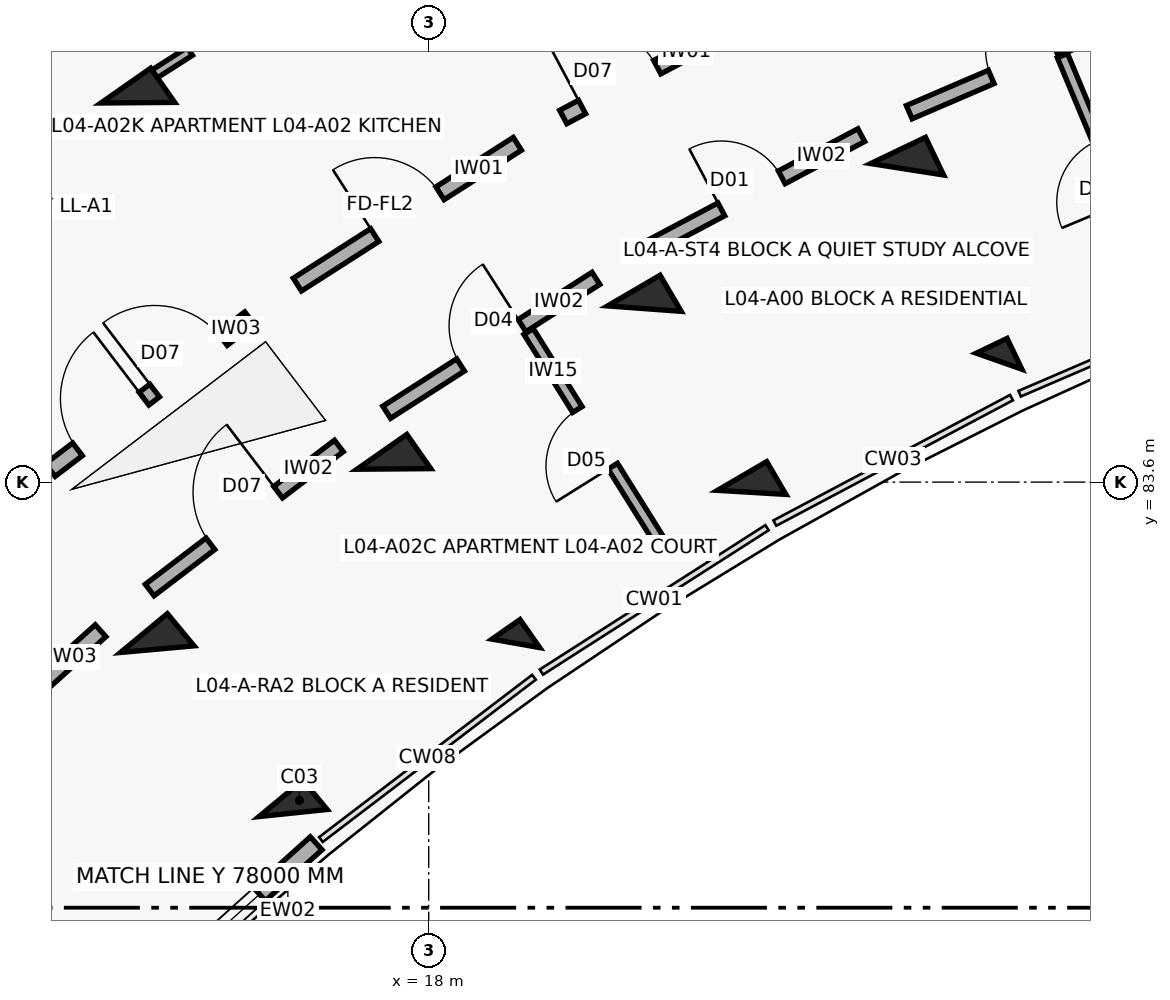
"""IFC4 building model, lengths in metres.
Left out: names, types, materials, properties, quantities, classifications, styles, units other than length and angle.
Written with IfcOpenShell. Run it as: python <this file> out.ifc"""

import sys

from ifc_helpers import new_model, si_unit, direction, frame, frame_2d, origin, origin_2d, place, context, subcontext, project, spatial, rectangle, extrude, element, fill, save


model = new_model("IFC4")
c1 = context("Model", 3, precision=1e-05, world=origin(), true_north=direction((0.0, 1.0)))
c2 = subcontext(c1, "Body", "Model", "MODEL_VIEW")
j1 = project(units=[si_unit("LENGTHUNIT", "METRE"), si_unit("PLANEANGLEUNIT", "RADIAN")], contexts=[c1])
p1 = place(None, origin())
s1 = spatial("IfcSite", under=j1, at=p1, CompositionType="ELEMENT")
p2 = place(p1, origin())
s2 = spatial("IfcBuilding", under=s1, at=p2, CompositionType="ELEMENT")
p3 = place(p2, frame((0.0, 0.0, 14.3)))
s3 = spatial("IfcBuildingStorey", under=s2, at=p3, CompositionType="ELEMENT", Elevation=14.3)
p4 = place(p3, frame((16.215, 79.245, 0.0), z_axis=(0.0, 0.0, 1.0), x_axis=(-0.637961754089, 0.770068049148, 0.0)))
e1 = element("IfcColumn", 1, at=p4, inside=s3, PredefinedType="COLUMN", context=c2, shape_type="SweptSolid", body=[
    extrude(rectangle(XDim=0.5, YDim=0.75, at=origin_2d()), origin(), (0.0, 0.0, 1.0), 3.1),
])
p5 = place(p3, frame((14.429, 81.402, 0.0), z_axis=(0.0, 0.0, 1.0), x_axis=(-0.637961754089, 0.770068049148, 0.0)))
e2 = element("IfcColumn", 2, at=p5, inside=s3, PredefinedType="COLUMN", context=c2, shape_type="SweptSolid", body=[
    extrude(rectangle(XDim=0.55, YDim=0.8, at=origin_2d()), origin(), (0.0, 0.0, 1.0), 3.1),
])
p6 = place(p3, frame((19.146, 81.478, 0.0), z_axis=(0.0, 0.0, 1.0), x_axis=(-0.573004420611, 0.819552276527, 0.0)))
e3 = element("IfcColumn", 3, at=p6, inside=s3, PredefinedType="COLUMN", context=c2, shape_type="SweptSolid", body=[
    extrude(rectangle(XDim=0.45, YDim=0.45, at=origin_2d()), origin(), (0.0, 0.0, 1.0), 3.1),
])
for number, where, z_axis, x_axis in (
    (4, (17.542, 83.773, 0.0), (0.0, 0.0, 1.0), (-0.573, 0.82, 0.0)),
    (5, (14.172, 88.592, 0.0), (0.0, 0.0, 1.0), (-0.573, 0.82, 0.0)),
):
    element("IfcColumn", number, at=place(p3, frame(where, z_axis=z_axis, x_axis=x_axis)), inside=s3, PredefinedType="COLUMN", context=c2, shape_type="SweptSolid", body=[
        extrude(rectangle(XDim=0.55, YDim=0.8, at=origin_2d()), origin(), (0.0, 0.0, 1.0), 3.1),
    ])
p7 = place(p3, frame((22.249, 83.464, 0.0), z_axis=(0.0, 0.0, 1.0), x_axis=(-0.504226211181, 0.863571611366, 0.0)))
e6 = element("IfcColumn", 6, at=p7, inside=s3, PredefinedType="COLUMN", context=c2, shape_type="SweptSolid", body=[
    extrude(rectangle(XDim=0.5, YDim=0.75, at=origin_2d()), origin(), (0.0, 0.0, 1.0), 3.1),
])
p8 = place(p3, frame((20.837, 85.882, 0.0), z_axis=(0.0, 0.0, 1.0), x_axis=(-0.504226211181, 0.863571611366, 0.0)))
e7 = element("IfcColumn", 7, at=p8, inside=s3, PredefinedType="COLUMN", context=c2, shape_type="SweptSolid", body=[
    extrude(rectangle(XDim=0.55, YDim=0.8, at=origin_2d()), origin(), (0.0, 0.0, 1.0), 3.1),
])
p9 = place(p3, frame((25.504, 85.191, 0.0), z_axis=(0.0, 0.0, 1.0), x_axis=(-0.432085748802, 0.901832526405, 0.0)))
e8 = element("IfcColumn", 8, at=p9, inside=s3, PredefinedType="COLUMN", context=c2, shape_type="SweptSolid", body=[
    extrude(rectangle(XDim=0.45, YDim=0.45, at=origin_2d()), origin(), (0.0, 0.0, 1.0), 3.1),
])
p10 = place(p3, frame((24.294, 87.716, 0.0), z_axis=(0.0, 0.0, 1.0), x_axis=(-0.432085748802, 0.901832526405, 0.0)))
e9 = element("IfcColumn", 9, at=p10, inside=s3, PredefinedType="COLUMN", context=c2, shape_type="SweptSolid", body=[
    extrude(rectangle(XDim=0.55, YDim=0.8, at=origin_2d()), origin(), (0.0, 0.0, 1.0), 3.1),
])
p11 = place(p3, frame((13.84, 76.437, 0.0), z_axis=(0.0, 0.0, 1.0), x_axis=(0.743385092197, 0.668863666751, 0.0)))
e10 = element("IfcWall", 10, at=p11, inside=s3, PredefinedType="SOLIDWALL", context=c2, shape_type="SweptSolid", body=[
    extrude(rectangle(XDim=3.604, YDim=0.23, at=frame_2d((1.802, 0.0))), origin(), (0.0, 0.0, 1.0), 2.25),
])
p12 = place(p11, frame((1.002, 0.0, 0.32)))
e11 = element("IfcOpeningElement", 11, at=p12, cuts=e10, PredefinedType="OPENING", context=c2, shape_type="SweptSolid", body=[
    extrude(rectangle(XDim=1.6, YDim=1.5, at=frame_2d((0.8, 0.75))), frame((0.0, 0.125, 0.0), z_axis=(0.0, -1.0, 0.0), x_axis=(1.0, 0.0, 0.0)), (0.0, 0.0, 1.0), 0.25),
])
p13 = place(p3, frame((11.357, 79.552, 0.0), z_axis=(0.0, 0.0, 1.0), x_axis=(0.743387266925, 0.668861249718, 0.0)))
e12 = element("IfcWall", 12, at=p13, inside=s3, PredefinedType="SOLIDWALL", context=c2, shape_type="SweptSolid", body=[
    extrude(rectangle(XDim=3.128, YDim=0.21, at=frame_2d((1.564, 0.0))), origin(), (0.0, 0.0, 1.0), 2.08),
])
p14 = place(p13, frame((1.014, 0.0, 0.0)))
e13 = element("IfcOpeningElement", 13, at=p14, cuts=e12, PredefinedType="OPENING", context=c2, shape_type="SweptSolid", body=[
    extrude(rectangle(XDim=1.1, YDim=2.15, at=frame_2d((0.55, 1.075))), frame((0.0, 0.115, 0.0), z_axis=(0.0, -1.0, 0.0), x_axis=(1.0, 0.0, 0.0)), (0.0, 0.0, 1.0), 0.23),
])
p15 = place(p3, frame((13.021, 83.759, 0.0), z_axis=(0.0, 0.0, 1.0), x_axis=(0.795498026433, 0.605956178235, 0.0)))
e14 = element("IfcWall", 14, at=p15, inside=s3, PredefinedType="SOLIDWALL", context=c2, shape_type="SweptSolid", body=[
    extrude(rectangle(XDim=3.296, YDim=0.21, at=frame_2d((1.648, 0.0))), origin(), (0.0, 0.0, 1.0), 2.08),
])
p16 = place(p15, frame((0.45, 0.0, 0.0)))
e15 = element("IfcOpeningElement", 15, at=p16, cuts=e14, PredefinedType="OPENING", context=c2, shape_type="SweptSolid", body=[
    extrude(rectangle(XDim=1.1, YDim=2.15, at=frame_2d((0.55, 1.075))), frame((0.0, 0.115, 0.0), z_axis=(0.0, -1.0, 0.0), x_axis=(1.0, 0.0, 0.0)), (0.0, 0.0, 1.0), 0.23),
])
p17 = place(p15, frame((1.726, 0.0, 0.0)))
e16 = element("IfcOpeningElement", 16, at=p17, cuts=e14, PredefinedType="OPENING", context=c2, shape_type="SweptSolid", body=[
    extrude(rectangle(XDim=1.12, YDim=2.15, at=frame_2d((0.56, 1.075))), frame((0.0, 0.115, 0.0), z_axis=(0.0, -1.0, 0.0), x_axis=(1.0, 0.0, 0.0)), (0.0, 0.0, 1.0), 0.23),
])
p18 = place(p3, frame((14.329, 82.18, 0.0), z_axis=(0.0, 0.0, 1.0), x_axis=(0.795501577908, 0.605951515838, 0.0)))
e17 = element("IfcWall", 17, at=p18, inside=s3, PredefinedType="SOLIDWALL", context=c2, shape_type="SweptSolid", body=[
    extrude(rectangle(XDim=3.129, YDim=0.19, at=frame_2d((1.564, 0.0))), origin(), (0.0, 0.0, 1.0), 2.08),
])
p19 = place(p18, frame((1.004, 0.0, 0.0)))
e18 = element("IfcOpeningElement", 18, at=p19, cuts=e17, PredefinedType="OPENING", context=c2, shape_type="SweptSolid", body=[
    extrude(rectangle(XDim=1.12, YDim=2.15, at=frame_2d((0.56, 1.075))), frame((0.0, 0.105, 0.0), z_axis=(0.0, -1.0, 0.0), x_axis=(1.0, 0.0, 0.0)), (0.0, 0.0, 1.0), 0.21),
])
p20 = place(p3, frame((16.272, 86.199, 0.0), z_axis=(0.0, 0.0, 1.0), x_axis=(0.842257205985, 0.539075874963, 0.0)))
e19 = element("IfcWall", 19, at=p20, inside=s3, PredefinedType="SOLIDWALL", context=c2, shape_type="SweptSolid", body=[
    extrude(rectangle(XDim=3.436, YDim=0.2, at=frame_2d((1.718, 0.0))), origin(), (0.0, 0.0, 1.0), 2.08),
])
p21 = place(p20, frame((1.208, 0.0, 0.0)))
e20 = element("IfcOpeningElement", 20, at=p21, cuts=e19, PredefinedType="OPENING", context=c2, shape_type="SweptSolid", body=[
    extrude(rectangle(XDim=1.02, YDim=2.15, at=frame_2d((0.51, 1.075))), frame((0.0, 0.11, 0.0), z_axis=(0.0, -1.0, 0.0), x_axis=(1.0, 0.0, 0.0)), (0.0, 0.0, 1.0), 0.22),
])
p22 = place(p3, frame((17.447, 84.519, 0.0), z_axis=(0.0, 0.0, 1.0), x_axis=(0.842225276846, 0.539125758095, 0.0)))
e21 = element("IfcWall", 21, at=p22, inside=s3, PredefinedType="SOLIDWALL", context=c2, shape_type="SweptSolid", body=[
    extrude(rectangle(XDim=3.269, YDim=0.19, at=frame_2d((1.634, 0.0))), origin(), (0.0, 0.0, 1.0), 2.08),
])
p23 = place(p22, frame((1.154, 0.0, 0.0)))
e22 = element("IfcOpeningElement", 22, at=p23, cuts=e21, PredefinedType="OPENING", context=c2, shape_type="SweptSolid", body=[
    extrude(rectangle(XDim=0.96, YDim=2.1, at=frame_2d((0.48, 1.05))), frame((0.0, 0.105, 0.0), z_axis=(0.0, -1.0, 0.0), x_axis=(1.0, 0.0, 0.0)), (0.0, 0.0, 1.0), 0.21),
])
p24 = place(p3, frame((21.064, 82.783, 0.0), z_axis=(0.0, 0.0, 1.0), x_axis=(-0.53015188203, 0.847902696057, 0.0)))
e23 = element("IfcWall", 23, at=p24, inside=s3, PredefinedType="PARTITIONING", context=c2, shape_type="SweptSolid", body=[
    extrude(rectangle(XDim=3.3, YDim=0.145, at=frame_2d((1.65, 0.0))), origin(), (0.0, 0.0, 1.0), 2.08),
])
p25 = place(p24, frame((1.21, 0.0, 0.0)))
e24 = element("IfcOpeningElement", 24, at=p25, cuts=e23, PredefinedType="OPENING", context=c2, shape_type="SweptSolid", body=[
    extrude(rectangle(XDim=0.88, YDim=2.1, at=frame_2d((0.44, 1.05))), frame((0.0, 0.083, 0.0), z_axis=(0.0, -1.0, 0.0), x_axis=(1.0, 0.0, 0.0)), (0.0, 0.0, 1.0), 0.165),
])
p26 = place(p3, frame((14.311, 88.917, 0.0), z_axis=(0.0, 0.0, 1.0), x_axis=(0.842238809758, 0.53910461632, 0.0)))
e25 = element("IfcWall", 25, at=p26, inside=s3, PredefinedType="PARTITIONING", context=c2, shape_type="SweptSolid", body=[
    extrude(rectangle(XDim=3.81, YDim=0.125, at=frame_2d((1.905, 0.0))), origin(), (0.0, 0.0, 1.0), 2.08),
])
p27 = place(p26, frame((0.65, 0.0, 0.0)))
e26 = element("IfcOpeningElement", 26, at=p27, cuts=e25, PredefinedType="OPENING", context=c2, shape_type="SweptSolid", body=[
    extrude(rectangle(XDim=0.9, YDim=2.1, at=frame_2d((0.45, 1.05))), frame((0.0, 0.073, 0.0), z_axis=(0.0, -1.0, 0.0), x_axis=(1.0, 0.0, 0.0)), (0.0, 0.0, 1.0), 0.145),
])
p28 = place(p26, frame((2.28, 0.0, 0.0)))
e27 = element("IfcOpeningElement", 27, at=p28, cuts=e25, PredefinedType="OPENING", context=c2, shape_type="SweptSolid", body=[
    extrude(rectangle(XDim=0.88, YDim=2.1, at=frame_2d((0.44, 1.05))), frame((0.0, 0.073, 0.0), z_axis=(0.0, -1.0, 0.0), x_axis=(1.0, 0.0, 0.0)), (0.0, 0.0, 1.0), 0.145),
])
p29 = place(p3, frame((19.77, 88.404, 0.0), z_axis=(0.0, 0.0, 1.0), x_axis=(0.883410853063, 0.468599258099, 0.0)))
e28 = element("IfcWall", 28, at=p29, inside=s3, PredefinedType="SOLIDWALL", context=c2, shape_type="SweptSolid", body=[
    extrude(rectangle(XDim=3.436, YDim=0.2, at=frame_2d((1.718, 0.0))), origin(), (0.0, 0.0, 1.0), 2.08),
])
p30 = place(p29, frame((0.28, 0.0, 0.0)))
e29 = element("IfcOpeningElement", 29, at=p30, cuts=e28, PredefinedType="OPENING", context=c2, shape_type="SweptSolid", body=[
    extrude(rectangle(XDim=1.12, YDim=2.15, at=frame_2d((0.56, 1.075))), frame((0.0, 0.11, 0.0), z_axis=(0.0, -1.0, 0.0), x_axis=(1.0, 0.0, 0.0)), (0.0, 0.0, 1.0), 0.22),
])
p31 = place(p29, frame((2.266, 0.0, 0.0)))
e30 = element("IfcOpeningElement", 30, at=p31, cuts=e28, PredefinedType="OPENING", context=c2, shape_type="SweptSolid", body=[
    extrude(rectangle(XDim=0.95, YDim=2.1, at=frame_2d((0.475, 1.05))), frame((0.0, 0.11, 0.0), z_axis=(0.0, -1.0, 0.0), x_axis=(1.0, 0.0, 0.0)), (0.0, 0.0, 1.0), 0.22),
])
p32 = place(p3, frame((20.804, 86.634, 0.0), z_axis=(0.0, 0.0, 1.0), x_axis=(0.883444301944, 0.468536194293, 0.0)))
e31 = element("IfcWall", 31, at=p32, inside=s3, PredefinedType="SOLIDWALL", context=c2, shape_type="SweptSolid", body=[
    extrude(rectangle(XDim=3.269, YDim=0.19, at=frame_2d((1.634, 0.0))), origin(), (0.0, 0.0, 1.0), 2.08),
])
p33 = place(p32, frame((1.184, 0.0, 0.0)))
e32 = element("IfcOpeningElement", 32, at=p33, cuts=e31, PredefinedType="OPENING", context=c2, shape_type="SweptSolid", body=[
    extrude(rectangle(XDim=0.9, YDim=2.1, at=frame_2d((0.45, 1.05))), frame((0.0, 0.105, 0.0), z_axis=(0.0, -1.0, 0.0), x_axis=(1.0, 0.0, 0.0)), (0.0, 0.0, 1.0), 0.21),
])
p34 = place(p3, frame((24.322, 88.467, 0.0), z_axis=(0.0, 0.0, 1.0), x_axis=(0.918723391052, 0.394901672235, 0.0)))
e33 = element("IfcWall", 33, at=p34, inside=s3, PredefinedType="SOLIDWALL", context=c2, shape_type="SweptSolid", body=[
    extrude(rectangle(XDim=3.269, YDim=0.19, at=frame_2d((1.634, 0.0))), origin(), (0.0, 0.0, 1.0), 2.08),
])
p35 = place(p34, frame((1.174, 0.0, 0.0)))
e34 = element("IfcOpeningElement", 34, at=p35, cuts=e33, PredefinedType="OPENING", context=c2, shape_type="SweptSolid", body=[
    extrude(rectangle(XDim=0.92, YDim=2.1, at=frame_2d((0.46, 1.05))), frame((0.0, 0.105, 0.0), z_axis=(0.0, -1.0, 0.0), x_axis=(1.0, 0.0, 0.0)), (0.0, 0.0, 1.0), 0.21),
])
p36 = place(p3, frame((27.609, 86.166, 0.0), z_axis=(0.0, 0.0, 1.0), x_axis=(-0.385151143297, 0.922853507777, 0.0)))
e35 = element("IfcWall", 35, at=p36, inside=s3, PredefinedType="PARTITIONING", context=c2, shape_type="SweptSolid", body=[
    extrude(rectangle(XDim=3.3, YDim=0.145, at=frame_2d((1.65, 0.0))), origin(), (0.0, 0.0, 1.0), 2.08),
])
p37 = place(p36, frame((1.21, 0.0, 0.0)))
e36 = element("IfcOpeningElement", 36, at=p37, cuts=e35, PredefinedType="OPENING", context=c2, shape_type="SweptSolid", body=[
    extrude(rectangle(XDim=0.88, YDim=2.1, at=frame_2d((0.44, 1.05))), frame((0.0, 0.083, 0.0), z_axis=(0.0, -1.0, 0.0), x_axis=(1.0, 0.0, 0.0)), (0.0, 0.0, 1.0), 0.165),
])
p38 = place(p12, origin())
e37 = element("IfcWindow", 37, at=p38, inside=s3, PartitioningType="DOUBLE_PANEL_VERTICAL", PredefinedType="WINDOW", context=c2, shape_type="SweptSolid", body=[
    extrude(rectangle(XDim=1.6, YDim=1.5, at=frame_2d((0.8, 0.75))), frame((0.0, 0.03, 0.0), z_axis=(0.0, -1.0, 0.0), x_axis=(1.0, 0.0, 0.0)), (0.0, 0.0, 1.0), 0.06),
])
fill(e11, e37)
p39 = place(p16, origin())
e38 = element("IfcDoor", 38, at=p39, inside=s3, OperationType="SINGLE_SWING_RIGHT", PredefinedType="DOOR", context=c2, shape_type="SweptSolid", body=[
    extrude(rectangle(XDim=1.1, YDim=2.15, at=frame_2d((0.55, 1.075))), frame((0.0, 0.025, 0.0), z_axis=(0.0, -1.0, 0.0), x_axis=(1.0, 0.0, 0.0)), (0.0, 0.0, 1.0), 0.05),
])
fill(e15, e38)
p40 = place(p17, origin())
e39 = element("IfcDoor", 39, at=p40, inside=s3, OperationType="SINGLE_SWING_LEFT", PredefinedType="DOOR", context=c2, shape_type="SweptSolid", body=[
    extrude(rectangle(XDim=1.12, YDim=2.15, at=frame_2d((0.56, 1.075))), frame((0.0, 0.025, 0.0), z_axis=(0.0, -1.0, 0.0), x_axis=(1.0, 0.0, 0.0)), (0.0, 0.0, 1.0), 0.05),
])
fill(e16, e39)
p41 = place(p19, origin())
e40 = element("IfcDoor", 40, at=p41, inside=s3, OperationType="SINGLE_SWING_RIGHT", PredefinedType="DOOR", context=c2, shape_type="SweptSolid", body=[
    extrude(rectangle(XDim=1.12, YDim=2.15, at=frame_2d((0.56, 1.075))), frame((0.0, 0.025, 0.0), z_axis=(0.0, -1.0, 0.0), x_axis=(1.0, 0.0, 0.0)), (0.0, 0.0, 1.0), 0.05),
])
fill(e18, e40)
p42 = place(p21, origin())
e41 = element("IfcDoor", 41, at=p42, inside=s3, OperationType="SINGLE_SWING_LEFT", PredefinedType="DOOR", context=c2, shape_type="SweptSolid", body=[
    extrude(rectangle(XDim=1.02, YDim=2.15, at=frame_2d((0.51, 1.075))), frame((0.0, 0.025, 0.0), z_axis=(0.0, -1.0, 0.0), x_axis=(1.0, 0.0, 0.0)), (0.0, 0.0, 1.0), 0.05),
])
fill(e20, e41)
p43 = place(p23, origin())
e42 = element("IfcDoor", 42, at=p43, inside=s3, OperationType="SINGLE_SWING_RIGHT", PredefinedType="DOOR", context=c2, shape_type="SweptSolid", body=[
    extrude(rectangle(XDim=0.96, YDim=2.1, at=frame_2d((0.48, 1.05))), frame((0.0, 0.025, 0.0), z_axis=(0.0, -1.0, 0.0), x_axis=(1.0, 0.0, 0.0)), (0.0, 0.0, 1.0), 0.05),
])
fill(e22, e42)
p44 = place(p25, origin())
e43 = element("IfcDoor", 43, at=p44, inside=s3, OperationType="SINGLE_SWING_LEFT", PredefinedType="DOOR", context=c2, shape_type="SweptSolid", body=[
    extrude(rectangle(XDim=0.88, YDim=2.1, at=frame_2d((0.44, 1.05))), frame((0.0, 0.025, 0.0), z_axis=(0.0, -1.0, 0.0), x_axis=(1.0, 0.0, 0.0)), (0.0, 0.0, 1.0), 0.05),
])
fill(e24, e43)
p45 = place(p27, origin())
e44 = element("IfcDoor", 44, at=p45, inside=s3, OperationType="SINGLE_SWING_RIGHT", PredefinedType="DOOR", context=c2, shape_type="SweptSolid", body=[
    extrude(rectangle(XDim=0.9, YDim=2.1, at=frame_2d((0.45, 1.05))), frame((0.0, 0.025, 0.0), z_axis=(0.0, -1.0, 0.0), x_axis=(1.0, 0.0, 0.0)), (0.0, 0.0, 1.0), 0.05),
])
fill(e26, e44)
p46 = place(p30, origin())
e45 = element("IfcDoor", 45, at=p46, inside=s3, OperationType="SINGLE_SWING_LEFT", PredefinedType="DOOR", context=c2, shape_type="SweptSolid", body=[
    extrude(rectangle(XDim=1.12, YDim=2.15, at=frame_2d((0.56, 1.075))), frame((0.0, 0.025, 0.0), z_axis=(0.0, -1.0, 0.0), x_axis=(1.0, 0.0, 0.0)), (0.0, 0.0, 1.0), 0.05),
])
fill(e29, e45)
p47 = place(p33, origin())
e46 = element("IfcDoor", 46, at=p47, inside=s3, OperationType="SINGLE_SWING_LEFT", PredefinedType="DOOR", context=c2, shape_type="SweptSolid", body=[
    extrude(rectangle(XDim=0.9, YDim=2.1, at=frame_2d((0.45, 1.05))), frame((0.0, 0.025, 0.0), z_axis=(0.0, -1.0, 0.0), x_axis=(1.0, 0.0, 0.0)), (0.0, 0.0, 1.0), 0.05),
])
fill(e32, e46)
p48 = place(p35, origin())
e47 = element("IfcDoor", 47, at=p48, inside=s3, OperationType="SINGLE_SWING_RIGHT", PredefinedType="DOOR", context=c2, shape_type="SweptSolid", body=[
    extrude(rectangle(XDim=0.92, YDim=2.1, at=frame_2d((0.46, 1.05))), frame((0.0, 0.025, 0.0), z_axis=(0.0, -1.0, 0.0), x_axis=(1.0, 0.0, 0.0)), (0.0, 0.0, 1.0), 0.05),
])
fill(e34, e47)
save(model, sys.argv[1])
